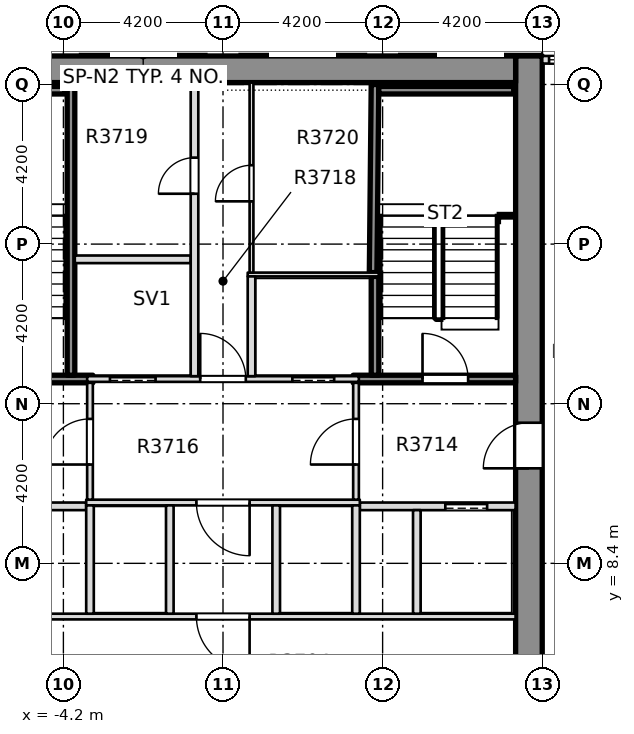
"""IFC4 building model, lengths in metres.
Left out: names, types, materials, properties, quantities, classifications, styles, units other than length and angle.
Written with IfcOpenShell. Run it as: python <this file> out.ifc"""

import sys

from ifc_helpers import new_model, si_unit, direction, frame, frame_2d, origin, place, context, subcontext, project, spatial, rectangle, extrude, element, fill, save


model = new_model("IFC4")
c1 = context("Model", 3, precision=1e-05, world=origin(), true_north=direction((0.0, 1.0)))
c2 = subcontext(c1, "Body", "Model", "MODEL_VIEW")
j1 = project(units=[si_unit("LENGTHUNIT", "METRE"), si_unit("PLANEANGLEUNIT", "RADIAN")], contexts=[c1])
p1 = place(None, origin())
s1 = spatial("IfcSite", under=j1, at=p1, CompositionType="ELEMENT")
p2 = place(p1, origin())
s2 = spatial("IfcBuilding", under=s1, at=p2, CompositionType="ELEMENT")
p3 = place(p2, frame((0.0, 0.0, 146.9)))
s3 = spatial("IfcBuildingStorey", under=s2, at=p3, CompositionType="ELEMENT", Elevation=146.9)
p4 = place(p3, frame((8.05, -8.4, -0.4), z_axis=(0.0, 0.0, 1.0), x_axis=(0.0, 1.0, 0.0)))
e1 = element("IfcWall", 1, at=p4, inside=s3, PredefinedType="SOLIDWALL", context=c2, shape_type="SweptSolid", body=[
    extrude(rectangle(XDim=30.15, YDim=0.7, at=frame_2d((15.075, 0.0))), origin(), (0.0, 0.0, 1.0), 3.45),
])
p5 = place(p4, frame((19.3, 0.0, 0.4)))
e2 = element("IfcOpeningElement", 2, at=p5, cuts=e1, PredefinedType="OPENING", context=c2, shape_type="SweptSolid", body=[
    extrude(rectangle(XDim=1.2, YDim=2.1, at=frame_2d((0.6, 1.05))), frame((0.0, 0.36, 0.0), z_axis=(0.0, -1.0, 0.0), x_axis=(1.0, 0.0, 0.0)), (0.0, 0.0, 1.0), 0.72),
])
p6 = place(p3, frame((-7.7, 21.4, -0.4), z_axis=(0.0, 0.0, 1.0), x_axis=(1.0, 0.0, 0.0)))
e3 = element("IfcWall", 3, at=p6, inside=s3, PredefinedType="SHEAR", context=c2, shape_type="SweptSolid", body=[
    extrude(rectangle(XDim=15.4, YDim=0.7, at=frame_2d((7.7, 0.0))), origin(), (0.0, 0.0, 1.0), 3.45),
])
p7 = place(p3, frame((12.05, 21.65, 0.0), z_axis=(0.0, 0.0, 1.0), x_axis=(-1.0, 0.0, 0.0)))
e4 = element("IfcWall", 4, at=p7, inside=s3, PredefinedType="STANDARD", context=c2, shape_type="SweptSolid", body=[
    extrude(rectangle(XDim=3.65, YDim=0.2, at=frame_2d((1.825, 0.0))), origin(), (0.0, 0.0, 1.0), 3.05),
])
p8 = place(p7, frame((1.67, 0.0, 0.2)))
e5 = element("IfcOpeningElement", 5, at=p8, cuts=e4, PredefinedType="OPENING", context=c2, shape_type="SweptSolid", body=[
    extrude(rectangle(XDim=1.8, YDim=2.65, at=frame_2d((0.9, 1.325))), frame((0.0, 0.11, 0.0), z_axis=(0.0, -1.0, 0.0), x_axis=(1.0, 0.0, 0.0)), (0.0, 0.0, 1.0), 0.22),
])
p9 = place(p3, frame((-7.699, 7.0, 0.0), z_axis=(0.0, 0.0, 1.0), x_axis=(1.0, 0.0, 0.0)))
e6 = element("IfcWall", 6, at=p9, inside=s3, PredefinedType="PARTITIONING", context=c2, shape_type="SweptSolid", body=[
    extrude(rectangle(XDim=15.398, YDim=0.15, at=frame_2d((7.699, 0.0))), origin(), (0.0, 0.0, 1.0), 3.05),
])
p10 = place(p9, frame((6.999, 0.0, 0.0)))
e7 = element("IfcOpeningElement", 7, at=p10, cuts=e6, PredefinedType="OPENING", context=c2, shape_type="SweptSolid", body=[
    extrude(rectangle(XDim=1.4, YDim=2.1, at=frame_2d((0.7, 1.05))), frame((0.0, 0.085, 0.0), z_axis=(0.0, -1.0, 0.0), x_axis=(1.0, 0.0, 0.0)), (0.0, 0.0, 1.0), 0.17),
])
p11 = place(p3, frame((-7.699, 9.9, 0.0), z_axis=(0.0, 0.0, 1.0), x_axis=(1.0, 0.0, 0.0)))
e8 = element("IfcWall", 8, at=p11, inside=s3, PredefinedType="PARTITIONING", context=c2, shape_type="SweptSolid", body=[
    extrude(rectangle(XDim=4.099, YDim=0.2, at=frame_2d((2.049, 0.0))), origin(), (0.0, 0.0, 1.0), 3.05),
])
p12 = place(p11, frame((0.749, 0.0, 0.0)))
e9 = element("IfcOpeningElement", 9, at=p12, cuts=e8, PredefinedType="OPENING", context=c2, shape_type="SweptSolid", body=[
    extrude(rectangle(XDim=1.1, YDim=2.1, at=frame_2d((0.55, 1.05))), frame((0.0, 0.11, 0.0), z_axis=(0.0, -1.0, 0.0), x_axis=(1.0, 0.0, 0.0)), (0.0, 0.0, 1.0), 0.22),
])
p13 = place(p3, frame((3.6, 9.9, 0.0), z_axis=(0.0, 0.0, 1.0), x_axis=(1.0, 0.0, 0.0)))
e10 = element("IfcWall", 10, at=p13, inside=s3, PredefinedType="PARTITIONING", context=c2, shape_type="SweptSolid", body=[
    extrude(rectangle(XDim=4.099, YDim=0.2, at=frame_2d((2.049, 0.0))), origin(), (0.0, 0.0, 1.0), 3.05),
])
p14 = place(p13, frame((2.25, 0.0, 0.0)))
e11 = element("IfcOpeningElement", 11, at=p14, cuts=e10, PredefinedType="OPENING", context=c2, shape_type="SweptSolid", body=[
    extrude(rectangle(XDim=1.1, YDim=2.1, at=frame_2d((0.55, 1.05))), frame((0.0, 0.11, 0.0), z_axis=(0.0, -1.0, 0.0), x_axis=(1.0, 0.0, 0.0)), (0.0, 0.0, 1.0), 0.22),
])
p15 = place(p3, frame((-3.6, 10.0, 0.0), z_axis=(0.0, 0.0, 1.0), x_axis=(1.0, 0.0, 0.0)))
e12 = element("IfcWall", 12, at=p15, inside=s3, PredefinedType="PARTITIONING", context=c2, shape_type="SweptSolid", body=[
    extrude(rectangle(XDim=7.2, YDim=0.15, at=frame_2d((3.6, 0.0))), origin(), (0.0, 0.0, 1.0), 3.05),
])
p16 = place(p15, frame((2.9, 0.0, 0.0)))
e13 = element("IfcOpeningElement", 13, at=p16, cuts=e12, PredefinedType="OPENING", context=c2, shape_type="SweptSolid", body=[
    extrude(rectangle(XDim=1.4, YDim=2.1, at=frame_2d((0.7, 1.05))), frame((0.0, 0.085, 0.0), z_axis=(0.0, -1.0, 0.0), x_axis=(1.0, 0.0, 0.0)), (0.0, 0.0, 1.0), 0.17),
])
p17 = place(p3, frame((-7.699, 13.25, 0.0), z_axis=(0.0, 0.0, 1.0), x_axis=(1.0, 0.0, 0.0)))
e14 = element("IfcWall", 14, at=p17, inside=s3, PredefinedType="SOLIDWALL", context=c2, shape_type="SweptSolid", body=[
    extrude(rectangle(XDim=4.274, YDim=0.2, at=frame_2d((2.137, 0.0))), origin(), (0.0, 0.0, 1.0), 3.05),
])
p18 = place(p17, frame((1.249, 0.0, 0.0)))
e15 = element("IfcOpeningElement", 15, at=p18, cuts=e14, PredefinedType="OPENING", context=c2, shape_type="SweptSolid", body=[
    extrude(rectangle(XDim=1.2, YDim=2.1, at=frame_2d((0.6, 1.05))), frame((0.0, 0.11, 0.0), z_axis=(0.0, -1.0, 0.0), x_axis=(1.0, 0.0, 0.0)), (0.0, 0.0, 1.0), 0.22),
])
p19 = place(p3, frame((-3.575, 13.25, 0.0), z_axis=(0.0, 0.0, 1.0), x_axis=(1.0, 0.0, 0.0)))
e16 = element("IfcWall", 16, at=p19, inside=s3, PredefinedType="PARTITIONING", context=c2, shape_type="SweptSolid", body=[
    extrude(rectangle(XDim=7.15, YDim=0.15, at=frame_2d((3.575, 0.0))), origin(), (0.0, 0.0, 1.0), 3.05),
])
p20 = place(p19, frame((0.6, 0.0, 0.0)))
e17 = element("IfcOpeningElement", 17, at=p20, cuts=e16, PredefinedType="OPENING", context=c2, shape_type="SweptSolid", body=[
    extrude(rectangle(XDim=1.2, YDim=2.1, at=frame_2d((0.6, 1.05))), frame((0.0, 0.085, 0.0), z_axis=(0.0, -1.0, 0.0), x_axis=(1.0, 0.0, 0.0)), (0.0, 0.0, 1.0), 0.17),
])
p21 = place(p19, frame((5.4, 0.0, 0.0)))
e18 = element("IfcOpeningElement", 18, at=p21, cuts=e16, PredefinedType="OPENING", context=c2, shape_type="SweptSolid", body=[
    extrude(rectangle(XDim=1.1, YDim=2.1, at=frame_2d((0.55, 1.05))), frame((0.0, 0.085, 0.0), z_axis=(0.0, -1.0, 0.0), x_axis=(1.0, 0.0, 0.0)), (0.0, 0.0, 1.0), 0.17),
])
p22 = place(p19, frame((2.975, 0.0, 0.0)))
e19 = element("IfcOpeningElement", 19, at=p22, cuts=e16, PredefinedType="OPENING", context=c2, shape_type="SweptSolid", body=[
    extrude(rectangle(XDim=1.2, YDim=2.1, at=frame_2d((0.6, 1.05))), frame((0.0, 0.085, 0.0), z_axis=(0.0, -1.0, 0.0), x_axis=(1.0, 0.0, 0.0)), (0.0, 0.0, 1.0), 0.17),
])
p23 = place(p3, frame((3.425, 13.25, 0.0), z_axis=(0.0, 0.0, 1.0), x_axis=(1.0, 0.0, 0.0)))
e20 = element("IfcWall", 20, at=p23, inside=s3, PredefinedType="SOLIDWALL", context=c2, shape_type="SweptSolid", body=[
    extrude(rectangle(XDim=4.274, YDim=0.2, at=frame_2d((2.137, 0.0))), origin(), (0.0, 0.0, 1.0), 3.05),
])
p24 = place(p23, frame((1.825, 0.0, 0.0)))
e21 = element("IfcOpeningElement", 21, at=p24, cuts=e20, PredefinedType="OPENING", context=c2, shape_type="SweptSolid", body=[
    extrude(rectangle(XDim=1.2, YDim=2.1, at=frame_2d((0.6, 1.05))), frame((0.0, 0.11, 0.0), z_axis=(0.0, -1.0, 0.0), x_axis=(1.0, 0.0, 0.0)), (0.0, 0.0, 1.0), 0.22),
])
p25 = place(p3, frame((0.65, 16.0, 0.0), z_axis=(0.0, 0.0, 1.0), x_axis=(1.0, 0.0, 0.0)))
e22 = element("IfcWall", 22, at=p25, inside=s3, PredefinedType="PARTITIONING", context=c2, shape_type="SweptSolid", body=[
    extrude(rectangle(XDim=3.45, YDim=0.1, at=frame_2d((1.725, 0.0))), origin(), (0.0, 0.0, 1.0), 3.05),
])
p26 = place(p3, frame((-3.9, 16.4, 0.0), z_axis=(0.0, 0.0, 1.0), x_axis=(1.0, 0.0, 0.0)))
e23 = element("IfcWall", 23, at=p26, inside=s3, PredefinedType="PARTITIONING", context=c2, shape_type="SweptSolid", body=[
    extrude(rectangle(XDim=3.05, YDim=0.2, at=frame_2d((1.525, 0.0))), origin(), (0.0, 0.0, 1.0), 3.05),
])
p27 = place(p3, frame((-4.0, 13.35, 0.0), z_axis=(0.0, 0.0, 1.0), x_axis=(0.0, 1.0, 0.0)))
e24 = element("IfcWall", 24, at=p27, inside=s3, PredefinedType="SOLIDWALL", context=c2, shape_type="SweptSolid", body=[
    extrude(rectangle(XDim=7.699, YDim=0.2, at=frame_2d((3.85, 0.0))), origin(), (0.0, 0.0, 1.0), 3.05),
])
p28 = place(p3, frame((-3.5, 7.075, 0.0), z_axis=(0.0, 0.0, 1.0), x_axis=(0.0, 1.0, 0.0)))
e25 = element("IfcWall", 25, at=p28, inside=s3, PredefinedType="PARTITIONING", context=c2, shape_type="SweptSolid", body=[
    extrude(rectangle(XDim=2.85, YDim=0.2, at=frame_2d((1.425, 0.0))), origin(), (0.0, 0.0, 1.0), 3.05),
])
p29 = place(p3, frame((-3.5, 10.075, 0.0), z_axis=(0.0, 0.0, 1.0), x_axis=(0.0, 1.0, 0.0)))
e26 = element("IfcWall", 26, at=p29, inside=s3, PredefinedType="PARTITIONING", context=c2, shape_type="SweptSolid", body=[
    extrude(rectangle(XDim=3.075, YDim=0.15, at=frame_2d((1.538, 0.0))), origin(), (0.0, 0.0, 1.0), 3.05),
])
p30 = place(p29, frame((0.925, 0.0, 0.0)))
e27 = element("IfcOpeningElement", 27, at=p30, cuts=e26, PredefinedType="OPENING", context=c2, shape_type="SweptSolid", body=[
    extrude(rectangle(XDim=1.2, YDim=2.1, at=frame_2d((0.6, 1.05))), frame((0.0, 0.085, 0.0), z_axis=(0.0, -1.0, 0.0), x_axis=(1.0, 0.0, 0.0)), (0.0, 0.0, 1.0), 0.17),
])
p31 = place(p3, frame((-1.4, 7.075, 0.0), z_axis=(0.0, 0.0, 1.0), x_axis=(0.0, 1.0, 0.0)))
e28 = element("IfcWall", 28, at=p31, inside=s3, PredefinedType="PARTITIONING", context=c2, shape_type="SweptSolid", body=[
    extrude(rectangle(XDim=2.85, YDim=0.2, at=frame_2d((1.425, 0.0))), origin(), (0.0, 0.0, 1.0), 3.05),
])
p32 = place(p3, frame((-0.75, 13.325, 0.0), z_axis=(0.0, 0.0, 1.0), x_axis=(0.0, 1.0, 0.0)))
e29 = element("IfcWall", 29, at=p32, inside=s3, PredefinedType="PARTITIONING", context=c2, shape_type="SweptSolid", body=[
    extrude(rectangle(XDim=7.724, YDim=0.2, at=frame_2d((3.862, 0.0))), origin(), (0.0, 0.0, 1.0), 3.05),
])
p33 = place(p32, frame((4.8, 0.0, 0.0)))
e30 = element("IfcOpeningElement", 30, at=p33, cuts=e29, PredefinedType="OPENING", context=c2, shape_type="SweptSolid", body=[
    extrude(rectangle(XDim=0.95, YDim=2.1, at=frame_2d((0.475, 1.05))), frame((0.0, 0.11, 0.0), z_axis=(0.0, -1.0, 0.0), x_axis=(1.0, 0.0, 0.0)), (0.0, 0.0, 1.0), 0.22),
])
p34 = place(p3, frame((0.75, 13.325, 0.0), z_axis=(0.0, 0.0, 1.0), x_axis=(0.0, 1.0, 0.0)))
e31 = element("IfcWall", 31, at=p34, inside=s3, PredefinedType="PARTITIONING", context=c2, shape_type="SweptSolid", body=[
    extrude(rectangle(XDim=2.625, YDim=0.2, at=frame_2d((1.312, 0.0))), origin(), (0.0, 0.0, 1.0), 3.05),
])
p35 = place(p3, frame((0.75, 16.05, 0.0), z_axis=(0.0, 0.0, 1.0), x_axis=(0.0, 1.0, 0.0)))
e32 = element("IfcWall", 32, at=p35, inside=s3, PredefinedType="PARTITIONING", context=c2, shape_type="SweptSolid", body=[
    extrude(rectangle(XDim=4.999, YDim=0.1, at=frame_2d((2.5, 0.0))), origin(), (0.0, 0.0, 1.0), 3.05),
])
p36 = place(p35, frame((1.875, 0.0, 0.0)))
e33 = element("IfcOpeningElement", 33, at=p36, cuts=e32, PredefinedType="OPENING", context=c2, shape_type="SweptSolid", body=[
    extrude(rectangle(XDim=0.95, YDim=2.1, at=frame_2d((0.475, 1.05))), frame((0.0, 0.06, 0.0), z_axis=(0.0, -1.0, 0.0), x_axis=(1.0, 0.0, 0.0)), (0.0, 0.0, 1.0), 0.12),
])
for number, where, z_axis, x_axis in (
    (34, (1.4, 7.075, 0.0), (0.0, 0.0, 1.0), (0.0, 1.0, 0.0)),
    (35, (3.5, 7.075, 0.0), (0.0, 0.0, 1.0), (0.0, 1.0, 0.0)),
):
    element("IfcWall", number, at=place(p3, frame(where, z_axis=z_axis, x_axis=x_axis)), inside=s3, PredefinedType="PARTITIONING", context=c2, shape_type="SweptSolid", body=[
        extrude(rectangle(XDim=2.85, YDim=0.2, at=frame_2d((1.425, 0.0))), origin(), (0.0, 0.0, 1.0), 3.05),
    ])
p37 = place(p3, frame((3.5, 10.075, 0.0), z_axis=(0.0, 0.0, 1.0), x_axis=(0.0, 1.0, 0.0)))
e36 = element("IfcWall", 36, at=p37, inside=s3, PredefinedType="PARTITIONING", context=c2, shape_type="SweptSolid", body=[
    extrude(rectangle(XDim=3.075, YDim=0.15, at=frame_2d((1.538, 0.0))), origin(), (0.0, 0.0, 1.0), 3.05),
])
p38 = place(p37, frame((0.925, 0.0, 0.0)))
e37 = element("IfcOpeningElement", 37, at=p38, cuts=e36, PredefinedType="OPENING", context=c2, shape_type="SweptSolid", body=[
    extrude(rectangle(XDim=1.2, YDim=2.1, at=frame_2d((0.6, 1.05))), frame((0.0, 0.085, 0.0), z_axis=(0.0, -1.0, 0.0), x_axis=(1.0, 0.0, 0.0)), (0.0, 0.0, 1.0), 0.17),
])
p39 = place(p3, frame((4.0, 13.35, 0.0), z_axis=(0.0, 0.0, 1.0), x_axis=(0.0, 1.0, 0.0)))
e38 = element("IfcWall", 38, at=p39, inside=s3, PredefinedType="SOLIDWALL", context=c2, shape_type="SweptSolid", body=[
    extrude(rectangle(XDim=2.6, YDim=0.2, at=frame_2d((1.3, 0.0))), origin(), (0.0, 0.0, 1.0), 3.05),
])
p40 = place(p3, frame((3.95, 16.05, 0.0), z_axis=(0.0, 0.0, 1.0), x_axis=(0.010112452169, 0.999948867848, 0.0)))
e39 = element("IfcWall", 39, at=p40, inside=s3, PredefinedType="SOLIDWALL", context=c2, shape_type="SweptSolid", body=[
    extrude(rectangle(XDim=4.949, YDim=0.2, at=frame_2d((2.475, 0.0))), origin(), (0.0, 0.0, 1.0), 3.05),
])
p41 = place(p3, frame((5.1, 7.075, 0.0), z_axis=(0.0, 0.0, 1.0), x_axis=(0.0, 1.0, 0.0)))
e40 = element("IfcWall", 40, at=p41, inside=s3, PredefinedType="PARTITIONING", context=c2, shape_type="SweptSolid", body=[
    extrude(rectangle(XDim=2.725, YDim=0.2, at=frame_2d((1.363, 0.0))), origin(), (0.0, 0.0, 1.0), 3.05),
])
p42 = place(p3, frame((-7.65, 20.85, 0.0), z_axis=(0.0, 0.0, 1.0), x_axis=(1.0, 0.0, 0.0)))
e41 = element("IfcWall", 41, at=p42, inside=s3, PredefinedType="SOLIDWALL", context=c2, shape_type="SweptSolid", body=[
    extrude(rectangle(XDim=3.5, YDim=0.2, at=frame_2d((1.75, 0.0))), origin(), (0.0, 0.0, 1.0), 3.05),
])
p43 = place(p3, frame((4.1, 20.85, 0.0), z_axis=(0.0, 0.0, 1.0), x_axis=(1.0, 0.0, 0.0)))
e42 = element("IfcWall", 42, at=p43, inside=s3, PredefinedType="SOLIDWALL", context=c2, shape_type="SweptSolid", body=[
    extrude(rectangle(XDim=3.55, YDim=0.2, at=frame_2d((1.775, 0.0))), origin(), (0.0, 0.0, 1.0), 3.05),
])
p44 = place(p8, origin())
e43 = element("IfcWindow", 43, at=p44, inside=s3, PartitioningType="SINGLE_PANEL", PredefinedType="WINDOW", context=c2, shape_type="SweptSolid", body=[
    extrude(rectangle(XDim=1.8, YDim=2.65, at=frame_2d((0.9, 1.325))), frame((0.0, 0.03, 0.0), z_axis=(0.0, -1.0, 0.0), x_axis=(1.0, 0.0, 0.0)), (0.0, 0.0, 1.0), 0.06),
])
fill(e5, e43)
p45 = place(p24, origin())
e44 = element("IfcDoor", 44, at=p45, inside=s3, OperationType="SINGLE_SWING_RIGHT", PredefinedType="DOOR", context=c2, shape_type="SweptSolid", body=[
    extrude(rectangle(XDim=1.2, YDim=2.1, at=frame_2d((0.6, 1.05))), frame((0.0, 0.025, 0.0), z_axis=(0.0, -1.0, 0.0), x_axis=(1.0, 0.0, 0.0)), (0.0, 0.0, 1.0), 0.05),
])
fill(e21, e44)
p46 = place(p14, origin())
e45 = element("IfcDoor", 45, at=p46, inside=s3, OperationType="SLIDING_TO_LEFT", PredefinedType="DOOR", context=c2, shape_type="SweptSolid", body=[
    extrude(rectangle(XDim=1.1, YDim=2.1, at=frame_2d((0.55, 1.05))), frame((0.0, 0.025, 0.0), z_axis=(0.0, -1.0, 0.0), x_axis=(1.0, 0.0, 0.0)), (0.0, 0.0, 1.0), 0.05),
])
fill(e11, e45)
p47 = place(p10, origin())
e46 = element("IfcDoor", 46, at=p47, inside=s3, OperationType="SINGLE_SWING_RIGHT", PredefinedType="DOOR", context=c2, shape_type="SweptSolid", body=[
    extrude(rectangle(XDim=1.4, YDim=2.1, at=frame_2d((0.7, 1.05))), frame((0.0, 0.025, 0.0), z_axis=(0.0, -1.0, 0.0), x_axis=(1.0, 0.0, 0.0)), (0.0, 0.0, 1.0), 0.05),
])
fill(e7, e46)
p48 = place(p16, origin())
e47 = element("IfcDoor", 47, at=p48, inside=s3, OperationType="SINGLE_SWING_RIGHT", PredefinedType="DOOR", context=c2, shape_type="SweptSolid", body=[
    extrude(rectangle(XDim=1.4, YDim=2.1, at=frame_2d((0.7, 1.05))), frame((0.0, 0.025, 0.0), z_axis=(0.0, -1.0, 0.0), x_axis=(1.0, 0.0, 0.0)), (0.0, 0.0, 1.0), 0.05),
])
fill(e13, e47)
p49 = place(p20, origin())
e48 = element("IfcDoor", 48, at=p49, inside=s3, OperationType="SLIDING_TO_RIGHT", PredefinedType="DOOR", context=c2, shape_type="SweptSolid", body=[
    extrude(rectangle(XDim=1.2, YDim=2.1, at=frame_2d((0.6, 1.05))), frame((0.0, 0.025, 0.0), z_axis=(0.0, -1.0, 0.0), x_axis=(1.0, 0.0, 0.0)), (0.0, 0.0, 1.0), 0.05),
])
fill(e17, e48)
p50 = place(p21, origin())
e49 = element("IfcDoor", 49, at=p50, inside=s3, OperationType="SLIDING_TO_LEFT", PredefinedType="DOOR", context=c2, shape_type="SweptSolid", body=[
    extrude(rectangle(XDim=1.1, YDim=2.1, at=frame_2d((0.55, 1.05))), frame((0.0, 0.025, 0.0), z_axis=(0.0, -1.0, 0.0), x_axis=(1.0, 0.0, 0.0)), (0.0, 0.0, 1.0), 0.05),
])
fill(e18, e49)
p51 = place(p22, origin())
e50 = element("IfcDoor", 50, at=p51, inside=s3, OperationType="SINGLE_SWING_RIGHT", PredefinedType="DOOR", context=c2, shape_type="SweptSolid", body=[
    extrude(rectangle(XDim=1.2, YDim=2.1, at=frame_2d((0.6, 1.05))), frame((0.0, 0.025, 0.0), z_axis=(0.0, -1.0, 0.0), x_axis=(1.0, 0.0, 0.0)), (0.0, 0.0, 1.0), 0.05),
])
fill(e19, e50)
p52 = place(p33, origin())
e51 = element("IfcDoor", 51, at=p52, inside=s3, OperationType="SINGLE_SWING_RIGHT", PredefinedType="DOOR", context=c2, shape_type="SweptSolid", body=[
    extrude(rectangle(XDim=0.95, YDim=2.1, at=frame_2d((0.475, 1.05))), frame((0.0, 0.025, 0.0), z_axis=(0.0, -1.0, 0.0), x_axis=(1.0, 0.0, 0.0)), (0.0, 0.0, 1.0), 0.05),
])
fill(e30, e51)
p53 = place(p36, origin())
e52 = element("IfcDoor", 52, at=p53, inside=s3, OperationType="SINGLE_SWING_LEFT", PredefinedType="DOOR", context=c2, shape_type="SweptSolid", body=[
    extrude(rectangle(XDim=0.95, YDim=2.1, at=frame_2d((0.475, 1.05))), frame((0.0, 0.025, 0.0), z_axis=(0.0, -1.0, 0.0), x_axis=(1.0, 0.0, 0.0)), (0.0, 0.0, 1.0), 0.05),
])
fill(e33, e52)
p54 = place(p30, origin())
e53 = element("IfcDoor", 53, at=p54, inside=s3, OperationType="SINGLE_SWING_RIGHT", PredefinedType="DOOR", context=c2, shape_type="SweptSolid", body=[
    extrude(rectangle(XDim=1.2, YDim=2.1, at=frame_2d((0.6, 1.05))), frame((0.0, 0.025, 0.0), z_axis=(0.0, -1.0, 0.0), x_axis=(1.0, 0.0, 0.0)), (0.0, 0.0, 1.0), 0.05),
])
fill(e27, e53)
p55 = place(p38, origin())
e54 = element("IfcDoor", 54, at=p55, inside=s3, OperationType="SINGLE_SWING_LEFT", PredefinedType="DOOR", context=c2, shape_type="SweptSolid", body=[
    extrude(rectangle(XDim=1.2, YDim=2.1, at=frame_2d((0.6, 1.05))), frame((0.0, 0.025, 0.0), z_axis=(0.0, -1.0, 0.0), x_axis=(1.0, 0.0, 0.0)), (0.0, 0.0, 1.0), 0.05),
])
fill(e37, e54)
p56 = place(p5, origin())
e55 = element("IfcDoor", 55, at=p56, inside=s3, OperationType="SINGLE_SWING_LEFT", PredefinedType="DOOR", context=c2, shape_type="SweptSolid", body=[
    extrude(rectangle(XDim=1.2, YDim=2.1, at=frame_2d((0.6, 1.05))), frame((0.0, 0.025, 0.0), z_axis=(0.0, -1.0, 0.0), x_axis=(1.0, 0.0, 0.0)), (0.0, 0.0, 1.0), 0.05),
])
fill(e2, e55)
save(model, sys.argv[1])
